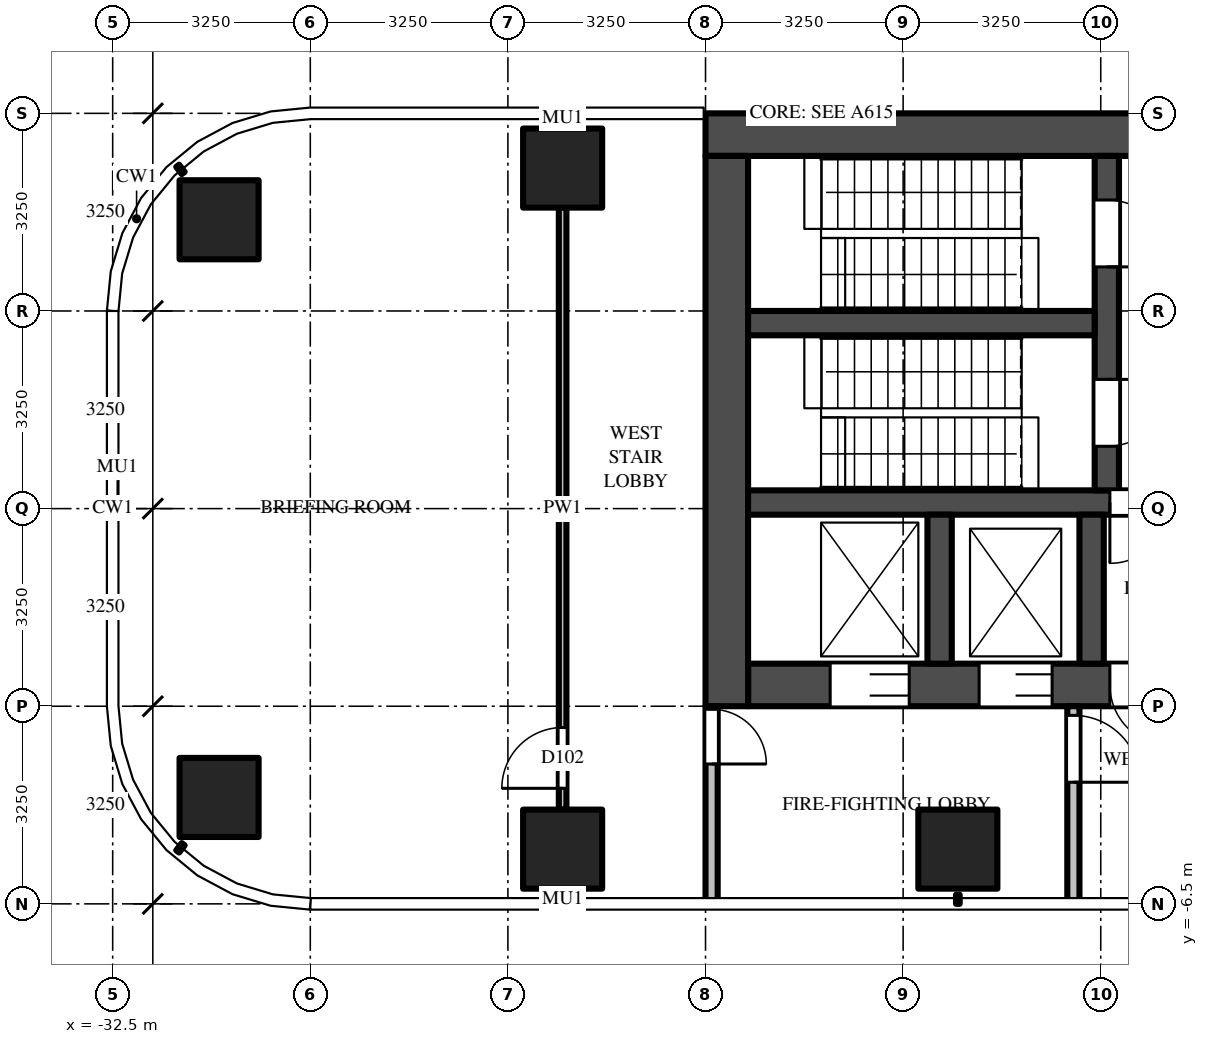
"""IFC4 building model, lengths in metres.
Left out: names, types, materials, properties, quantities, classifications, styles, units other than length and angle.
Written with IfcOpenShell. Run it as: python <this file> out.ifc"""

import sys

from ifc_helpers import new_model, si_unit, direction, frame, frame_2d, origin, origin_2d, place, context, subcontext, project, spatial, rectangle, extrude, source, transform, mapped, element, fill, save


model = new_model("IFC4")
c1 = context("Model", 3, precision=1e-05, world=origin(), true_north=direction((0.0, 1.0)))
c2 = subcontext(c1, "Body", "Model", "MODEL_VIEW")
j1 = project(units=[si_unit("LENGTHUNIT", "METRE"), si_unit("PLANEANGLEUNIT", "RADIAN")], contexts=[c1])
p1 = place(None, origin())
s1 = spatial("IfcSite", under=j1, at=p1, CompositionType="ELEMENT")
p2 = place(p1, origin())
s2 = spatial("IfcBuilding", under=s1, at=p2, CompositionType="ELEMENT")
p3 = place(p2, frame((0.0, 0.0, 124.5)))
s3 = spatial("IfcBuildingStorey", under=s2, at=p3, CompositionType="ELEMENT", Elevation=124.5)
m1 = source(origin(), c2, "Body", "SweptSolid", [
    extrude(rectangle(XDim=1.3, YDim=1.3, at=origin_2d()), origin(), (0.0, 0.0, 1.0), 4.5),
])
for number, where, z_axis, x_axis in (
    (1, (-18.6, -5.6, 0.0), (0.0, 0.0, 1.0), (1.0, 0.0, 0.0)),
    (2, (-25.1, -5.6, 0.0), (0.0, 0.0, 1.0), (1.0, 0.0, 0.0)),
    (3, (-30.75, -4.75, 0.0), (0.0, 0.0, 1.0), (1.0, 0.0, 0.0)),
    (4, (-25.1, 5.6, 0.0), (0.0, 0.0, 1.0), (1.0, 0.0, 0.0)),
    (5, (-30.75, 4.75, 0.0), (0.0, 0.0, 1.0), (1.0, 0.0, 0.0)),
):
    element("IfcColumn", number, at=place(p3, frame(where, z_axis=z_axis, x_axis=x_axis)), inside=s3, PredefinedType="COLUMN", context=c2, shape_type="MappedRepresentation", body=[
        mapped(m1, transform((0.0, 0.0, 0.0))),
    ])
m2 = source(origin(), c2, "Body", "SweptSolid", [
    extrude(rectangle(XDim=16.5, YDim=0.7, at=frame_2d((8.25, 0.0))), origin(), (0.0, 0.0, 1.0), 4.25),
])
p4 = place(p3, frame((-6.25, 6.15, 0.0), z_axis=(0.0, 0.0, 1.0), x_axis=(-1.0, 0.0, 0.0)))
e6 = element("IfcWall", 6, at=p4, inside=s3, PredefinedType="SHEAR", context=c2, shape_type="MappedRepresentation", body=[
    mapped(m2, transform((0.0, 0.0, 0.0))),
])
m3 = source(origin(), c2, "Body", "SweptSolid", [
    extrude(rectangle(XDim=14.85, YDim=0.7, at=frame_2d((7.425, 0.0))), origin(), (0.0, 0.0, 1.0), 4.25),
])
p5 = place(p3, frame((-7.2, -2.9, 0.0), z_axis=(0.0, 0.0, 1.0), x_axis=(-1.0, 0.0, 0.0)))
e7 = element("IfcWall", 7, at=p5, inside=s3, PredefinedType="SHEAR", context=c2, shape_type="MappedRepresentation", body=[
    mapped(m3, transform((0.0, 0.0, 0.0))),
])
m4 = source(origin(), c2, "Body", "SweptSolid", [
    extrude(rectangle(XDim=1.3, YDim=2.1, at=frame_2d((0.65, 1.05))), frame((0.0, 0.36, 0.0), z_axis=(0.0, -1.0, 0.0), x_axis=(1.0, 0.0, 0.0)), (0.0, 0.0, 1.0), 0.72),
])
p6 = place(p5, frame((12.2, 0.0, 0.0)))
e8 = element("IfcOpeningElement", 8, at=p6, cuts=e7, PredefinedType="OPENING", context=c2, shape_type="MappedRepresentation", body=[
    mapped(m4, transform((0.0, 0.0, 0.0))),
])
m5 = source(origin(), c2, "Body", "SweptSolid", [
    extrude(rectangle(XDim=1.2, YDim=2.1, at=frame_2d((0.6, 1.05))), frame((0.0, 0.36, 0.0), z_axis=(0.0, -1.0, 0.0), x_axis=(1.0, 0.0, 0.0)), (0.0, 0.0, 1.0), 0.72),
])
p7 = place(p5, frame((9.85, 0.0, 0.0)))
e9 = element("IfcOpeningElement", 9, at=p7, cuts=e7, PredefinedType="OPENING", context=c2, shape_type="MappedRepresentation", body=[
    mapped(m5, transform((0.0, 0.0, 0.0))),
])
m6 = source(origin(), c2, "Body", "SweptSolid", [
    extrude(rectangle(XDim=1.0, YDim=2.1, at=frame_2d((0.5, 1.05))), frame((0.0, 0.36, 0.0), z_axis=(0.0, -1.0, 0.0), x_axis=(1.0, 0.0, 0.0)), (0.0, 0.0, 1.0), 0.72),
])
p8 = place(p5, frame((7.9, 0.0, 0.0)))
e10 = element("IfcOpeningElement", 10, at=p8, cuts=e7, PredefinedType="OPENING", context=c2, shape_type="MappedRepresentation", body=[
    mapped(m6, transform((0.0, 0.0, 0.0))),
])
m7 = source(origin(), c2, "Body", "SweptSolid", [
    extrude(rectangle(XDim=0.9, YDim=2.1, at=frame_2d((0.45, 1.05))), frame((0.0, 0.36, 0.0), z_axis=(0.0, -1.0, 0.0), x_axis=(1.0, 0.0, 0.0)), (0.0, 0.0, 1.0), 0.72),
])
p9 = place(p5, frame((0.65, 0.0, 0.0)))
e11 = element("IfcOpeningElement", 11, at=p9, cuts=e7, PredefinedType="OPENING", context=c2, shape_type="MappedRepresentation", body=[
    mapped(m7, transform((0.0, 0.0, 0.0))),
])
p10 = place(p5, frame((3.2, 0.0, 0.0)))
e12 = element("IfcOpeningElement", 12, at=p10, cuts=e7, PredefinedType="OPENING", context=c2, shape_type="MappedRepresentation", body=[
    mapped(m6, transform((0.0, 0.0, 0.0))),
])
p11 = place(p5, frame((5.85, 0.0, 0.0)))
e13 = element("IfcOpeningElement", 13, at=p11, cuts=e7, PredefinedType="OPENING", context=c2, shape_type="MappedRepresentation", body=[
    mapped(m7, transform((0.0, 0.0, 0.0))),
])
m8 = source(origin(), c2, "Body", "SweptSolid", [
    extrude(rectangle(XDim=9.05, YDim=0.7, at=frame_2d((4.525, 0.0))), origin(), (0.0, 0.0, 1.0), 4.25),
])
p12 = place(p3, frame((-22.4, 5.8, 0.0), z_axis=(0.0, 0.0, 1.0), x_axis=(0.0, -1.0, 0.0)))
e14 = element("IfcWall", 14, at=p12, inside=s3, PredefinedType="SHEAR", context=c2, shape_type="MappedRepresentation", body=[
    mapped(m8, transform((0.0, 0.0, 0.0))),
])
m9 = source(origin(), c2, "Body", "SweptSolid", [
    extrude(rectangle(XDim=14.85, YDim=0.4, at=frame_2d((7.425, 0.0))), origin(), (0.0, 0.0, 1.0), 4.25),
])
p13 = place(p3, frame((-7.2, 0.1, 0.0), z_axis=(0.0, 0.0, 1.0), x_axis=(-1.0, 0.0, 0.0)))
e15 = element("IfcWall", 15, at=p13, inside=s3, PredefinedType="SHEAR", context=c2, shape_type="MappedRepresentation", body=[
    mapped(m9, transform((0.0, 0.0, 0.0))),
])
m10 = source(origin(), c2, "Body", "SweptSolid", [
    extrude(rectangle(XDim=1.0, YDim=2.1, at=frame_2d((0.5, 1.05))), frame((0.0, 0.21, 0.0), z_axis=(0.0, -1.0, 0.0), x_axis=(1.0, 0.0, 0.0)), (0.0, 0.0, 1.0), 0.42),
])
p14 = place(p13, frame((7.9, 0.0, 0.0)))
e16 = element("IfcOpeningElement", 16, at=p14, cuts=e15, PredefinedType="OPENING", context=c2, shape_type="MappedRepresentation", body=[
    mapped(m10, transform((0.0, 0.0, 0.0))),
])
m11 = source(origin(), c2, "Body", "SweptSolid", [
    extrude(rectangle(XDim=5.5, YDim=0.4, at=frame_2d((2.75, 0.0))), origin(), (0.0, 0.0, 1.0), 4.25),
])
p15 = place(p3, frame((-16.15, 5.8, 0.0), z_axis=(0.0, 0.0, 1.0), x_axis=(0.0, -1.0, 0.0)))
e17 = element("IfcWall", 17, at=p15, inside=s3, PredefinedType="SHEAR", context=c2, shape_type="MappedRepresentation", body=[
    mapped(m11, transform((0.0, 0.0, 0.0))),
])
m12 = source(origin(), c2, "Body", "SweptSolid", [
    extrude(rectangle(XDim=1.1, YDim=2.1, at=frame_2d((0.55, 1.05))), frame((0.0, 0.21, 0.0), z_axis=(0.0, -1.0, 0.0), x_axis=(1.0, 0.0, 0.0)), (0.0, 0.0, 1.0), 0.42),
])
p16 = place(p15, frame((0.725, 0.0, 0.0)))
e18 = element("IfcOpeningElement", 18, at=p16, cuts=e17, PredefinedType="OPENING", context=c2, shape_type="MappedRepresentation", body=[
    mapped(m12, transform((0.0, 0.0, 0.0))),
])
p17 = place(p15, frame((3.675, 0.0, 0.0)))
e19 = element("IfcOpeningElement", 19, at=p17, cuts=e17, PredefinedType="OPENING", context=c2, shape_type="MappedRepresentation", body=[
    mapped(m12, transform((0.0, 0.0, 0.0))),
])
m13 = source(origin(), c2, "Body", "SweptSolid", [
    extrude(rectangle(XDim=5.7, YDim=0.4, at=frame_2d((2.85, 0.0))), origin(), (0.0, 0.0, 1.0), 4.25),
])
p18 = place(p3, frame((-16.35, 3.05, 0.0), z_axis=(0.0, 0.0, 1.0), x_axis=(-1.0, 0.0, 0.0)))
e20 = element("IfcWall", 20, at=p18, inside=s3, PredefinedType="SHEAR", context=c2, shape_type="MappedRepresentation", body=[
    mapped(m13, transform((0.0, 0.0, 0.0))),
])
m14 = source(origin(), c2, "Body", "SweptSolid", [
    extrude(rectangle(XDim=2.45, YDim=0.4, at=frame_2d((1.225, 0.0))), origin(), (0.0, 0.0, 1.0), 4.25),
])
for number, where, z_axis, x_axis in (
    (21, (-16.4, -0.1, 0.0), (0.0, 0.0, 1.0), (0.0, -1.0, 0.0)),
    (22, (-18.9, -0.1, 0.0), (0.0, 0.0, 1.0), (0.0, -1.0, 0.0)),
):
    element("IfcWall", number, at=place(p3, frame(where, z_axis=z_axis, x_axis=x_axis)), inside=s3, PredefinedType="SHEAR", context=c2, shape_type="MappedRepresentation", body=[
        mapped(m14, transform((0.0, 0.0, 0.0))),
    ])
m15 = source(origin(), c2, "Body", "SweptSolid", [
    extrude(rectangle(XDim=3.25, YDim=0.2, at=frame_2d((1.625, 0.0))), origin(), (0.0, 0.0, 1.0), 4.25),
])
p19 = place(p3, frame((-16.7, -3.25, 0.0), z_axis=(0.0, 0.0, 1.0), x_axis=(0.0, -1.0, 0.0)))
e23 = element("IfcWall", 23, at=p19, inside=s3, PredefinedType="PARTITIONING", context=c2, shape_type="MappedRepresentation", body=[
    mapped(m15, transform((0.0, 0.0, 0.0))),
])
m16 = source(origin(), c2, "Body", "SweptSolid", [
    extrude(rectangle(XDim=1.1, YDim=2.1, at=frame_2d((0.55, 1.05))), frame((0.0, 0.11, 0.0), z_axis=(0.0, -1.0, 0.0), x_axis=(1.0, 0.0, 0.0)), (0.0, 0.0, 1.0), 0.22),
])
p20 = place(p19, frame((0.15, 0.0, 0.0)))
e24 = element("IfcOpeningElement", 24, at=p20, cuts=e23, PredefinedType="OPENING", context=c2, shape_type="MappedRepresentation", body=[
    mapped(m16, transform((0.0, 0.0, 0.0))),
])
p21 = place(p3, frame((-22.65, -3.25, 0.0), z_axis=(0.0, 0.0, 1.0), x_axis=(0.0, -1.0, 0.0)))
e25 = element("IfcWall", 25, at=p21, inside=s3, PredefinedType="PARTITIONING", context=c2, shape_type="MappedRepresentation", body=[
    mapped(m15, transform((0.0, 0.0, 0.0))),
])
m17 = source(origin(), c2, "Body", "SweptSolid", [
    extrude(rectangle(XDim=0.9, YDim=2.1, at=frame_2d((0.45, 1.05))), frame((0.0, 0.11, 0.0), z_axis=(0.0, -1.0, 0.0), x_axis=(1.0, 0.0, 0.0)), (0.0, 0.0, 1.0), 0.22),
])
p22 = place(p21, frame((0.05, 0.0, 0.0)))
e26 = element("IfcOpeningElement", 26, at=p22, cuts=e25, PredefinedType="OPENING", context=c2, shape_type="MappedRepresentation", body=[
    mapped(m17, transform((0.0, 0.0, 0.0))),
])
m18 = source(origin(), c2, "Body", "SweptSolid", [
    extrude(rectangle(XDim=9.9, YDim=0.125, at=frame_2d((4.95, 0.0))), origin(), (0.0, 0.0, 1.0), 3.468),
])
p23 = place(p3, frame((-25.1, -4.95, 0.0), z_axis=(0.0, 0.0, 1.0), x_axis=(0.0, 1.0, 0.0)))
e27 = element("IfcWall", 27, at=p23, inside=s3, PredefinedType="PARTITIONING", context=c2, shape_type="MappedRepresentation", body=[
    mapped(m18, transform((0.0, 0.0, 0.0))),
])
m19 = source(origin(), c2, "Body", "SweptSolid", [
    extrude(rectangle(XDim=1.0, YDim=2.1, at=frame_2d((0.5, 1.05))), frame((0.0, 0.073, 0.0), z_axis=(0.0, -1.0, 0.0), x_axis=(1.0, 0.0, 0.0)), (0.0, 0.0, 1.0), 0.145),
])
p24 = place(p23, frame((0.35, 0.0, 0.0)))
e28 = element("IfcOpeningElement", 28, at=p24, cuts=e27, PredefinedType="OPENING", context=c2, shape_type="MappedRepresentation", body=[
    mapped(m19, transform((0.0, 0.0, 0.0))),
])
m20 = source(origin(), c2, "Body", "SweptSolid", [
    extrude(rectangle(XDim=1.3, YDim=2.1, at=frame_2d((0.65, 1.05))), frame((0.0, -0.275, 0.0), z_axis=(0.0, -1.0, 0.0), x_axis=(1.0, 0.0, 0.0)), (0.0, 0.0, 1.0), 0.05),
])
p25 = place(p6, origin())
e29 = element("IfcDoor", 29, at=p25, inside=s3, OperationType="DOUBLE_DOOR_SLIDING", PredefinedType="DOOR", context=c2, shape_type="MappedRepresentation", body=[
    mapped(m20, transform((0.0, 0.0, 0.0))),
])
fill(e8, e29)
m21 = source(origin(), c2, "Body", "SweptSolid", [
    extrude(rectangle(XDim=1.2, YDim=2.1, at=frame_2d((0.6, 1.05))), frame((0.0, -0.275, 0.0), z_axis=(0.0, -1.0, 0.0), x_axis=(1.0, 0.0, 0.0)), (0.0, 0.0, 1.0), 0.05),
])
p26 = place(p7, origin())
e30 = element("IfcDoor", 30, at=p26, inside=s3, OperationType="DOUBLE_DOOR_SLIDING", PredefinedType="DOOR", context=c2, shape_type="MappedRepresentation", body=[
    mapped(m21, transform((0.0, 0.0, 0.0))),
])
fill(e9, e30)
m22 = source(origin(), c2, "Body", "SweptSolid", [
    extrude(rectangle(XDim=1.1, YDim=2.1, at=frame_2d((0.55, 1.05))), frame((0.0, 0.025, 0.0), z_axis=(0.0, -1.0, 0.0), x_axis=(1.0, 0.0, 0.0)), (0.0, 0.0, 1.0), 0.05),
])
p27 = place(p16, origin())
e31 = element("IfcDoor", 31, at=p27, inside=s3, OperationType="SINGLE_SWING_RIGHT", PredefinedType="DOOR", context=c2, shape_type="MappedRepresentation", body=[
    mapped(m22, transform((0.0, 0.0, 0.0))),
])
fill(e18, e31)
p28 = place(p17, origin())
e32 = element("IfcDoor", 32, at=p28, inside=s3, OperationType="SINGLE_SWING_LEFT", PredefinedType="DOOR", context=c2, shape_type="MappedRepresentation", body=[
    mapped(m22, transform((0.0, 0.0, 0.0))),
])
fill(e19, e32)
m23 = source(origin(), c2, "Body", "SweptSolid", [
    extrude(rectangle(XDim=1.0, YDim=2.1, at=frame_2d((0.5, 1.05))), frame((0.0, 0.025, 0.0), z_axis=(0.0, -1.0, 0.0), x_axis=(1.0, 0.0, 0.0)), (0.0, 0.0, 1.0), 0.05),
])
p29 = place(p14, origin())
e33 = element("IfcDoor", 33, at=p29, inside=s3, OperationType="SINGLE_SWING_RIGHT", PredefinedType="DOOR", context=c2, shape_type="MappedRepresentation", body=[
    mapped(m23, transform((0.0, 0.0, 0.0))),
])
fill(e16, e33)
m24 = source(origin(), c2, "Body", "SweptSolid", [
    extrude(rectangle(XDim=1.0, YDim=2.1, at=frame_2d((0.5, 1.05))), frame((0.0, -0.275, 0.0), z_axis=(0.0, -1.0, 0.0), x_axis=(1.0, 0.0, 0.0)), (0.0, 0.0, 1.0), 0.05),
])
p30 = place(p8, origin())
e34 = element("IfcDoor", 34, at=p30, inside=s3, OperationType="SINGLE_SWING_LEFT", PredefinedType="DOOR", context=c2, shape_type="MappedRepresentation", body=[
    mapped(m24, transform((0.0, 0.0, 0.0))),
])
fill(e10, e34)
p31 = place(p20, origin())
e35 = element("IfcDoor", 35, at=p31, inside=s3, OperationType="SINGLE_SWING_RIGHT", PredefinedType="DOOR", context=c2, shape_type="MappedRepresentation", body=[
    mapped(m22, transform((0.0, 0.0, 0.0))),
])
fill(e24, e35)
m25 = source(origin(), c2, "Body", "SweptSolid", [
    extrude(rectangle(XDim=0.9, YDim=2.1, at=frame_2d((0.45, 1.05))), frame((0.0, 0.025, 0.0), z_axis=(0.0, -1.0, 0.0), x_axis=(1.0, 0.0, 0.0)), (0.0, 0.0, 1.0), 0.05),
])
p32 = place(p22, origin())
e36 = element("IfcDoor", 36, at=p32, inside=s3, OperationType="SINGLE_SWING_RIGHT", PredefinedType="DOOR", context=c2, shape_type="MappedRepresentation", body=[
    mapped(m25, transform((0.0, 0.0, 0.0))),
])
fill(e26, e36)
p33 = place(p24, origin())
e37 = element("IfcDoor", 37, at=p33, inside=s3, OperationType="SINGLE_SWING_LEFT", PredefinedType="DOOR", context=c2, shape_type="MappedRepresentation", body=[
    mapped(m23, transform((0.0, 0.0, 0.0))),
])
fill(e28, e37)
save(model, sys.argv[1])
